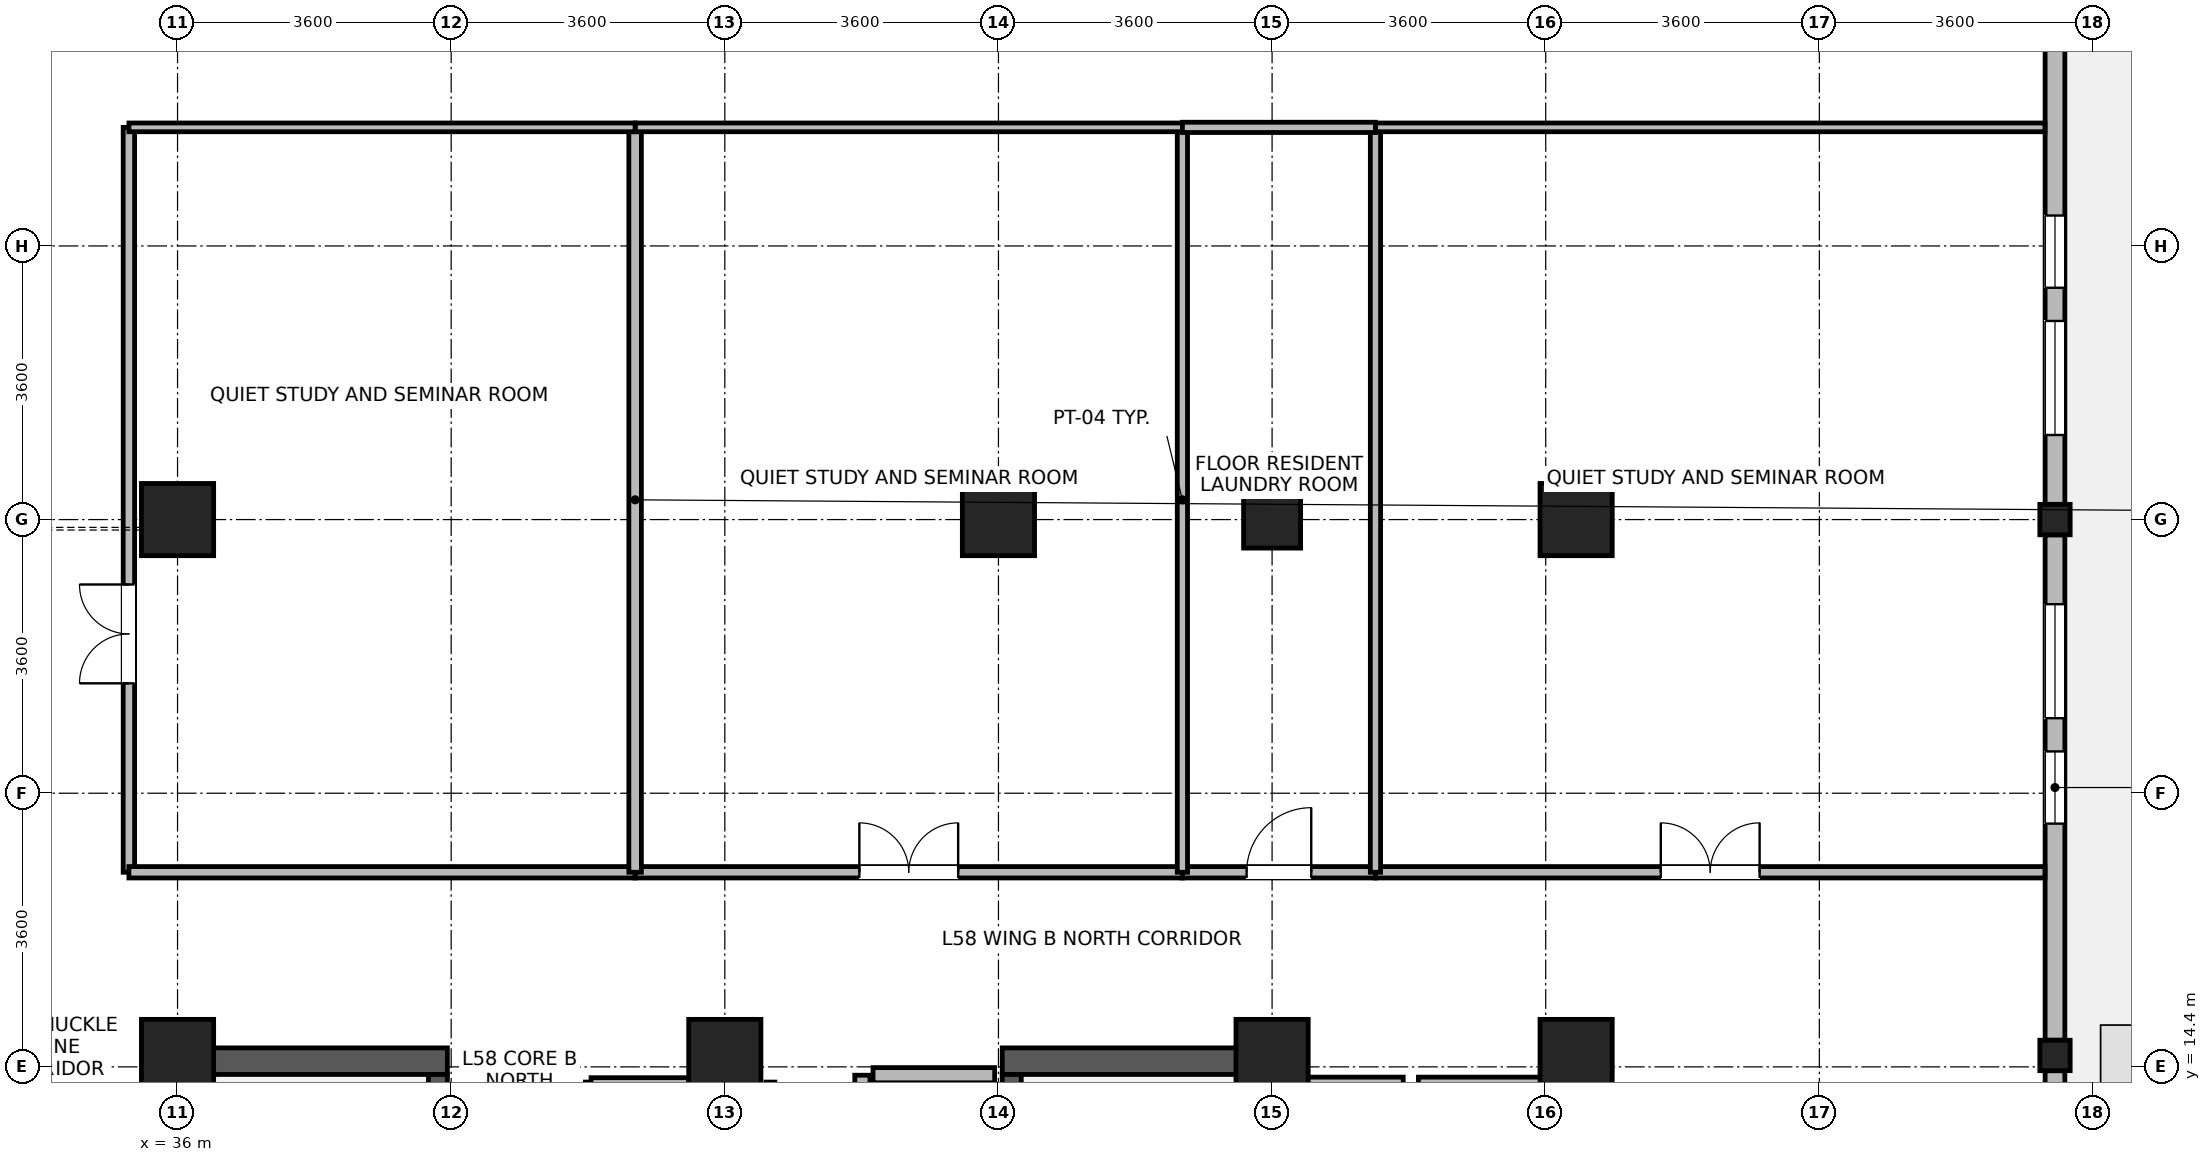
"""IFC4 building model, lengths in metres.
Left out: names, types, materials, properties, quantities, classifications, styles, units other than length and angle.
Written with IfcOpenShell. Run it as: python <this file> out.ifc"""

import sys

from ifc_helpers import new_model, si_unit, direction, frame, frame_2d, origin, origin_2d, place, context, subcontext, project, spatial, rectangle, i_section, extrude, source, transform, mapped, element, fill, save


model = new_model("IFC4")
c1 = context("Model", 3, precision=1e-05, world=origin(), true_north=direction((0.0, 1.0)))
c2 = subcontext(c1, "Body", "Model", "MODEL_VIEW")
j1 = project(units=[si_unit("LENGTHUNIT", "METRE"), si_unit("PLANEANGLEUNIT", "RADIAN")], contexts=[c1])
p1 = place(None, origin())
s1 = spatial("IfcSite", under=j1, at=p1, CompositionType="ELEMENT")
p2 = place(p1, origin())
s2 = spatial("IfcBuilding", under=s1, at=p2, CompositionType="ELEMENT")
p3 = place(p2, frame((0.0, 0.0, 227.7)))
s3 = spatial("IfcBuildingStorey", under=s2, at=p3, CompositionType="ELEMENT", Elevation=227.7)
for number, where, z_axis, x_axis in (
    (1, (36.175, 6.95, 0.0), (0.0, 0.0, 1.0), (0.0, 1.0, 0.0)),
    (2, (50.225, 6.95, 0.0), (0.0, 0.0, 1.0), (0.0, 1.0, 0.0)),
):
    element("IfcWall", number, at=place(p3, frame(where, z_axis=z_axis, x_axis=x_axis)), inside=s3, PredefinedType="SHEAR", context=c2, shape_type="SweptSolid", body=[
        extrude(rectangle(XDim=7.7, YDim=0.35, at=frame_2d((3.85, 0.0))), origin(), (0.0, 0.0, 1.0), 3.47),
    ])
for number, where, z_axis, x_axis in (
    (3, (36.35, 14.475, 0.0), (0.0, 0.0, 1.0), (1.0, 0.0, 0.0)),
    (4, (46.85, 14.475, 0.0), (0.0, 0.0, 1.0), (1.0, 0.0, 0.0)),
):
    element("IfcWall", number, at=place(p3, frame(where, z_axis=z_axis, x_axis=x_axis)), inside=s3, PredefinedType="SHEAR", context=c2, shape_type="SweptSolid", body=[
        extrude(rectangle(XDim=3.2, YDim=0.35, at=frame_2d((1.6, 0.0))), origin(), (0.0, 0.0, 1.0), 3.47),
    ])
p4 = place(p3, frame((39.425, 7.3, 0.0), z_axis=(0.0, 0.0, 1.0), x_axis=(0.0, 1.0, 0.0)))
e5 = element("IfcWall", 5, at=p4, inside=s3, PredefinedType="SHEAR", context=c2, shape_type="SweptSolid", body=[
    extrude(rectangle(XDim=7.0, YDim=0.25, at=frame_2d((3.5, 0.0))), origin(), (0.0, 0.0, 1.0), 3.47),
])
p5 = place(p4, frame((0.15, 0.0, 0.0)))
e6 = element("IfcOpeningElement", 6, at=p5, cuts=e5, PredefinedType="OPENING", context=c2, shape_type="SweptSolid", body=[
    extrude(rectangle(XDim=1.1, YDim=2.08, at=frame_2d((0.55, 1.04))), frame((0.0, 0.135, 0.0), z_axis=(0.0, -1.0, 0.0), x_axis=(1.0, 0.0, 0.0)), (0.0, 0.0, 1.0), 0.27),
])
p6 = place(p3, frame((46.975, 7.3, 0.0), z_axis=(0.0, 0.0, 1.0), x_axis=(0.0, 1.0, 0.0)))
e7 = element("IfcWall", 7, at=p6, inside=s3, PredefinedType="SHEAR", context=c2, shape_type="SweptSolid", body=[
    extrude(rectangle(XDim=7.0, YDim=0.25, at=frame_2d((3.5, 0.0))), origin(), (0.0, 0.0, 1.0), 3.47),
])
p7 = place(p6, frame((0.15, 0.0, 0.0)))
e8 = element("IfcOpeningElement", 8, at=p7, cuts=e7, PredefinedType="OPENING", context=c2, shape_type="SweptSolid", body=[
    extrude(rectangle(XDim=1.1, YDim=2.08, at=frame_2d((0.55, 1.04))), frame((0.0, 0.135, 0.0), z_axis=(0.0, -1.0, 0.0), x_axis=(1.0, 0.0, 0.0)), (0.0, 0.0, 1.0), 0.27),
])
m1 = source(origin(), c2, "Body", "SweptSolid", [
    extrude(rectangle(XDim=0.95, YDim=0.95, at=origin_2d()), origin(), (0.0, 0.0, 1.0), 3.7),
])
for number, where, z_axis, x_axis in (
    (9, (36.0, 21.6, 0.0), (0.0, 0.0, 1.0), (1.0, 0.0, 0.0)),
    (10, (46.8, 21.6, 0.0), (0.0, 0.0, 1.0), (1.0, 0.0, 0.0)),
    (11, (36.0, 14.55, 0.0), (0.0, 0.0, 1.0), (1.0, 0.0, 0.0)),
    (12, (43.2, 14.55, 0.0), (0.0, 0.0, 1.0), (1.0, 0.0, 0.0)),
    (13, (50.4, 14.55, 0.0), (0.0, 0.0, 1.0), (1.0, 0.0, 0.0)),
):
    element("IfcColumn", number, at=place(p3, frame(where, z_axis=z_axis, x_axis=x_axis)), inside=s3, PredefinedType="COLUMN", context=c2, shape_type="MappedRepresentation", body=[
        mapped(m1, transform((0.0, 0.0, 0.0), x_axis=(1.0, 0.0, 0.0), y_axis=(0.0, 1.0, 0.0), z_axis=(0.0, 0.0, 1.0), scale=1.0)),
    ])
m2 = source(origin(), c2, "Body", "SweptSolid", [
    extrude(rectangle(XDim=0.75, YDim=0.75, at=origin_2d()), origin(), (0.0, 0.0, 1.0), 3.7),
])
p8 = place(p3, frame((50.4, 21.6, 0.0), z_axis=(0.0, 0.0, 1.0), x_axis=(1.0, 0.0, 0.0)))
e14 = element("IfcColumn", 14, at=p8, inside=s3, PredefinedType="PILASTER", context=c2, shape_type="MappedRepresentation", body=[
    mapped(m2, transform((0.0, 0.0, 0.0), x_axis=(1.0, 0.0, 0.0), y_axis=(0.0, 1.0, 0.0), z_axis=(0.0, 0.0, 1.0), scale=1.0)),
])
for number, where, z_axis, x_axis in (
    (15, (54.4, 14.55, 0.0), (0.0, 0.0, 1.0), (1.0, 0.0, 0.0)),
    (16, (54.4, 21.6, 0.0), (0.0, 0.0, 1.0), (1.0, 0.0, 0.0)),
):
    element("IfcColumn", number, at=place(p3, frame(where, z_axis=z_axis, x_axis=x_axis)), inside=s3, PredefinedType="COLUMN", context=c2, shape_type="MappedRepresentation", body=[
        mapped(m1, transform((0.0, 0.0, 0.0), x_axis=(1.0, 0.0, 0.0), y_axis=(0.0, 1.0, 0.0), z_axis=(0.0, 0.0, 1.0), scale=1.0)),
    ])
m3 = source(origin(), c2, "Body", "SweptSolid", [
    extrude(i_section(OverallWidth=0.399, OverallDepth=0.4, WebThickness=0.017, FlangeThickness=0.023, FilletRadius=0.015, at=origin_2d()), origin(), (0.0, 0.0, 1.0), 3.7),
])
for number, where, z_axis, x_axis in (
    (17, (60.7, 14.55, 0.0), (0.0, 0.0, 1.0), (1.0, 0.0, 0.0)),
    (18, (60.7, 21.6, 0.0), (0.0, 0.0, 1.0), (1.0, 0.0, 0.0)),
):
    element("IfcColumn", number, at=place(p3, frame(where, z_axis=z_axis, x_axis=x_axis)), inside=s3, PredefinedType="COLUMN", context=c2, shape_type="MappedRepresentation", body=[
        mapped(m3, transform((0.0, 0.0, 0.0), x_axis=(1.0, 0.0, 0.0), y_axis=(0.0, 1.0, 0.0), z_axis=(0.0, 0.0, 1.0), scale=1.0)),
    ])
p9 = place(p3, frame((60.7, 14.349, 0.0), z_axis=(0.0, 0.0, 1.0), x_axis=(0.0, -1.0, 0.0)))
e19 = element("IfcWall", 19, at=p9, inside=s3, PredefinedType="STANDARD", context=c2, shape_type="SweptSolid", body=[
    extrude(rectangle(XDim=5.079, YDim=0.26, at=frame_2d((2.54, 0.0))), origin(), (0.0, 0.0, 1.0), 3.05),
])
p10 = place(p9, frame((1.79, 0.0, 0.0)))
e20 = element("IfcOpeningElement", 20, at=p10, cuts=e19, PredefinedType="OPENING", context=c2, shape_type="SweptSolid", body=[
    extrude(rectangle(XDim=1.5, YDim=2.15, at=frame_2d((0.75, 1.075))), frame((0.0, 0.14, 0.0), z_axis=(0.0, -1.0, 0.0), x_axis=(1.0, 0.0, 0.0)), (0.0, 0.0, 1.0), 0.28),
])
p11 = place(p3, frame((60.7, 21.399, 0.0), z_axis=(0.0, 0.0, 1.0), x_axis=(0.0, -1.0, 0.0)))
e21 = element("IfcWall", 21, at=p11, inside=s3, PredefinedType="STANDARD", context=c2, shape_type="SweptSolid", body=[
    extrude(rectangle(XDim=6.648, YDim=0.26, at=frame_2d((3.324, 0.0))), origin(), (0.0, 0.0, 1.0), 3.05),
])
p12 = place(p11, frame((0.912, 0.0, 0.85)))
e22 = element("IfcOpeningElement", 22, at=p12, cuts=e21, PredefinedType="OPENING", context=c2, shape_type="SweptSolid", body=[
    extrude(rectangle(XDim=1.5, YDim=1.85, at=frame_2d((0.75, 0.925))), frame((0.0, 0.14, 0.0), z_axis=(0.0, -1.0, 0.0), x_axis=(1.0, 0.0, 0.0)), (0.0, 0.0, 1.0), 0.28),
])
p13 = place(p11, frame((2.849, 0.0, 0.85)))
e23 = element("IfcOpeningElement", 23, at=p13, cuts=e21, PredefinedType="OPENING", context=c2, shape_type="SweptSolid", body=[
    extrude(rectangle(XDim=0.95, YDim=1.75, at=frame_2d((0.475, 0.875))), frame((0.0, 0.14, 0.0), z_axis=(0.0, -1.0, 0.0), x_axis=(1.0, 0.0, 0.0)), (0.0, 0.0, 1.0), 0.28),
])
p14 = place(p3, frame((60.7, 28.449, 0.0), z_axis=(0.0, 0.0, 1.0), x_axis=(0.0, -1.0, 0.0)))
e24 = element("IfcWall", 24, at=p14, inside=s3, PredefinedType="STANDARD", context=c2, shape_type="SweptSolid", body=[
    extrude(rectangle(XDim=6.648, YDim=0.26, at=frame_2d((3.324, 0.0))), origin(), (0.0, 0.0, 1.0), 3.05),
])
p15 = place(p14, frame((4.236, 0.0, 0.85)))
e25 = element("IfcOpeningElement", 25, at=p15, cuts=e24, PredefinedType="OPENING", context=c2, shape_type="SweptSolid", body=[
    extrude(rectangle(XDim=1.5, YDim=1.85, at=frame_2d((0.75, 0.925))), frame((0.0, 0.14, 0.0), z_axis=(0.0, -1.0, 0.0), x_axis=(1.0, 0.0, 0.0)), (0.0, 0.0, 1.0), 0.28),
])
p16 = place(p14, frame((2.849, 0.0, 0.85)))
e26 = element("IfcOpeningElement", 26, at=p16, cuts=e24, PredefinedType="OPENING", context=c2, shape_type="SweptSolid", body=[
    extrude(rectangle(XDim=0.95, YDim=1.75, at=frame_2d((0.475, 0.875))), frame((0.0, 0.14, 0.0), z_axis=(0.0, -1.0, 0.0), x_axis=(1.0, 0.0, 0.0)), (0.0, 0.0, 1.0), 0.28),
])
p17 = place(p3, frame((50.475, 14.165, 0.0), z_axis=(0.0, 0.0, 1.0), x_axis=(1.0, 0.0, 0.0)))
e27 = element("IfcWall", 27, at=p17, inside=s3, PredefinedType="PARTITIONING", context=c2, shape_type="SweptSolid", body=[
    extrude(rectangle(XDim=1.65, YDim=0.2, at=frame_2d((0.825, 0.0))), origin(), (0.0, 0.0, 1.0), 3.45),
])
p18 = place(p3, frame((52.325, 14.165, 0.0), z_axis=(0.0, 0.0, 1.0), x_axis=(1.0, 0.0, 0.0)))
e28 = element("IfcWall", 28, at=p18, inside=s3, PredefinedType="PARTITIONING", context=c2, shape_type="SweptSolid", body=[
    extrude(rectangle(XDim=1.65, YDim=0.2, at=frame_2d((0.825, 0.0))), origin(), (0.0, 0.0, 1.0), 3.45),
])
p19 = place(p3, frame((45.15, 14.29, 0.0), z_axis=(0.0, 0.0, 1.0), x_axis=(1.0, 0.0, 0.0)))
e29 = element("IfcWall", 29, at=p19, inside=s3, PredefinedType="PARTITIONING", context=c2, shape_type="SweptSolid", body=[
    extrude(rectangle(XDim=1.6, YDim=0.2, at=frame_2d((0.8, 0.0))), origin(), (0.0, 0.0, 1.0), 2.55),
])
p20 = place(p3, frame((45.01, 11.61, 0.0), z_axis=(0.0, 0.0, 1.0), x_axis=(0.0, 1.0, 0.0)))
e30 = element("IfcWall", 30, at=p20, inside=s3, PredefinedType="PARTITIONING", context=c2, shape_type="SweptSolid", body=[
    extrude(rectangle(XDim=2.68, YDim=0.2, at=frame_2d((1.34, 0.0))), origin(), (0.0, 0.0, 1.0), 3.45),
])
p21 = place(p3, frame((35.36, 16.96, 0.0), z_axis=(0.0, 0.0, 1.0), x_axis=(0.0, 1.0, 0.0)))
e31 = element("IfcWall", 31, at=p21, inside=s3, PredefinedType="PARTITIONING", context=c2, shape_type="SweptSolid", body=[
    extrude(rectangle(XDim=9.8, YDim=0.15, at=frame_2d((4.9, 0.0))), origin(), (0.0, 0.0, 1.0), 3.45),
])
p22 = place(p21, frame((2.486, 0.0, 0.0)))
e32 = element("IfcOpeningElement", 32, at=p22, cuts=e31, PredefinedType="OPENING", context=c2, shape_type="SweptSolid", body=[
    extrude(rectangle(XDim=1.3, YDim=2.12, at=frame_2d((0.65, 1.06))), frame((0.0, 0.085, 0.0), z_axis=(0.0, -1.0, 0.0), x_axis=(1.0, 0.0, 0.0)), (0.0, 0.0, 1.0), 0.17),
])
p23 = place(p3, frame((51.76, 16.96, 0.0), z_axis=(0.0, 0.0, 1.0), x_axis=(1.0, 0.0, 0.0)))
e33 = element("IfcWall", 33, at=p23, inside=s3, PredefinedType="PARTITIONING", context=c2, shape_type="SweptSolid", body=[
    extrude(rectangle(XDim=8.808, YDim=0.15, at=frame_2d((4.404, 0.0))), origin(), (0.0, 0.0, 1.0), 3.45),
])
p24 = place(p23, frame((3.754, 0.0, 0.0)))
e34 = element("IfcOpeningElement", 34, at=p24, cuts=e33, PredefinedType="OPENING", context=c2, shape_type="SweptSolid", body=[
    extrude(rectangle(XDim=1.3, YDim=2.12, at=frame_2d((0.65, 1.06))), frame((0.0, 0.085, 0.0), z_axis=(0.0, -1.0, 0.0), x_axis=(1.0, 0.0, 0.0)), (0.0, 0.0, 1.0), 0.17),
])
p25 = place(p3, frame((42.02, 16.96, 0.0), z_axis=(0.0, 0.0, 1.0), x_axis=(1.0, 0.0, 0.0)))
e35 = element("IfcWall", 35, at=p25, inside=s3, PredefinedType="PARTITIONING", context=c2, shape_type="SweptSolid", body=[
    extrude(rectangle(XDim=7.2, YDim=0.15, at=frame_2d((3.6, 0.0))), origin(), (0.0, 0.0, 1.0), 3.45),
])
p26 = place(p25, frame((2.95, 0.0, 0.0)))
e36 = element("IfcOpeningElement", 36, at=p26, cuts=e35, PredefinedType="OPENING", context=c2, shape_type="SweptSolid", body=[
    extrude(rectangle(XDim=1.3, YDim=2.12, at=frame_2d((0.65, 1.06))), frame((0.0, 0.085, 0.0), z_axis=(0.0, -1.0, 0.0), x_axis=(1.0, 0.0, 0.0)), (0.0, 0.0, 1.0), 0.17),
])
p27 = place(p3, frame((35.36, 16.96, 0.0), z_axis=(0.0, 0.0, 1.0), x_axis=(1.0, 0.0, 0.0)))
e37 = element("IfcWall", 37, at=p27, inside=s3, PredefinedType="PARTITIONING", context=c2, shape_type="SweptSolid", body=[
    extrude(rectangle(XDim=6.66, YDim=0.15, at=frame_2d((3.33, 0.0))), origin(), (0.0, 0.0, 1.0), 3.45),
])
p28 = place(p3, frame((49.22, 16.96, 0.0), z_axis=(0.0, 0.0, 1.0), x_axis=(1.0, 0.0, 0.0)))
e38 = element("IfcWall", 38, at=p28, inside=s3, PredefinedType="PARTITIONING", context=c2, shape_type="SweptSolid", body=[
    extrude(rectangle(XDim=2.54, YDim=0.15, at=frame_2d((1.27, 0.0))), origin(), (0.0, 0.0, 1.0), 3.45),
])
p29 = place(p28, frame((0.845, 0.0, 0.0)))
e39 = element("IfcOpeningElement", 39, at=p29, cuts=e38, PredefinedType="OPENING", context=c2, shape_type="SweptSolid", body=[
    extrude(rectangle(XDim=0.85, YDim=2.04, at=frame_2d((0.425, 1.02))), frame((0.0, 0.085, 0.0), z_axis=(0.0, -1.0, 0.0), x_axis=(1.0, 0.0, 0.0)), (0.0, 0.0, 1.0), 0.17),
])
p30 = place(p3, frame((42.02, 16.96, 0.0), z_axis=(0.0, 0.0, 1.0), x_axis=(0.0, 1.0, 0.0)))
e40 = element("IfcWall", 40, at=p30, inside=s3, PredefinedType="PARTITIONING", context=c2, shape_type="SweptSolid", body=[
    extrude(rectangle(XDim=9.8, YDim=0.165, at=frame_2d((4.9, 0.0))), origin(), (0.0, 0.0, 1.0), 3.45),
])
for number, where, z_axis, x_axis in (
    (41, (49.22, 16.96, 0.0), (0.0, 0.0, 1.0), (0.0, 1.0, 0.0)),
    (42, (51.76, 16.96, 0.0), (0.0, 0.0, 1.0), (0.0, 1.0, 0.0)),
):
    element("IfcWall", number, at=place(p3, frame(where, z_axis=z_axis, x_axis=x_axis)), inside=s3, PredefinedType="PARTITIONING", context=c2, shape_type="SweptSolid", body=[
        extrude(rectangle(XDim=9.8, YDim=0.135, at=frame_2d((4.9, 0.0))), origin(), (0.0, 0.0, 1.0), 3.45),
    ])
p31 = place(p3, frame((51.76, 26.76, 0.0), z_axis=(0.0, 0.0, 1.0), x_axis=(1.0, 0.0, 0.0)))
e43 = element("IfcWall", 43, at=p31, inside=s3, PredefinedType="PARTITIONING", context=c2, shape_type="SweptSolid", body=[
    extrude(rectangle(XDim=8.808, YDim=0.115, at=frame_2d((4.404, 0.0))), origin(), (0.0, 0.0, 1.0), 3.45),
])
p32 = place(p3, frame((42.02, 26.76, 0.0), z_axis=(0.0, 0.0, 1.0), x_axis=(1.0, 0.0, 0.0)))
e44 = element("IfcWall", 44, at=p32, inside=s3, PredefinedType="PARTITIONING", context=c2, shape_type="SweptSolid", body=[
    extrude(rectangle(XDim=7.2, YDim=0.115, at=frame_2d((3.6, 0.0))), origin(), (0.0, 0.0, 1.0), 3.45),
])
p33 = place(p3, frame((35.36, 26.76, 0.0), z_axis=(0.0, 0.0, 1.0), x_axis=(1.0, 0.0, 0.0)))
e45 = element("IfcWall", 45, at=p33, inside=s3, PredefinedType="PARTITIONING", context=c2, shape_type="SweptSolid", body=[
    extrude(rectangle(XDim=6.66, YDim=0.115, at=frame_2d((3.33, 0.0))), origin(), (0.0, 0.0, 1.0), 3.45),
])
p34 = place(p3, frame((49.22, 26.76, 0.0), z_axis=(0.0, 0.0, 1.0), x_axis=(1.0, 0.0, 0.0)))
e46 = element("IfcWall", 46, at=p34, inside=s3, PredefinedType="PARTITIONING", context=c2, shape_type="SweptSolid", body=[
    extrude(rectangle(XDim=2.54, YDim=0.135, at=frame_2d((1.27, 0.0))), origin(), (0.0, 0.0, 1.0), 3.45),
])
p35 = place(p3, frame((41.44, 14.2, 0.0), z_axis=(0.0, 0.0, 1.0), x_axis=(1.0, 0.0, 0.0)))
e47 = element("IfcWall", 47, at=p35, inside=s3, PredefinedType="PARTITIONING", context=c2, shape_type="SweptSolid", body=[
    extrude(rectangle(XDim=1.285, YDim=0.115, at=frame_2d((0.643, 0.0))), origin(), (0.0, 0.0, 1.0), 2.55),
])
p36 = place(p12, origin())
e48 = element("IfcWindow", 48, at=p36, inside=s3, PartitioningType="SINGLE_PANEL", PredefinedType="WINDOW", context=c2, shape_type="SweptSolid", body=[
    extrude(rectangle(XDim=1.5, YDim=1.85, at=frame_2d((0.75, 0.925))), frame((0.0, 0.03, 0.0), z_axis=(0.0, -1.0, 0.0), x_axis=(1.0, 0.0, 0.0)), (0.0, 0.0, 1.0), 0.06),
])
fill(e22, e48)
p37 = place(p13, origin())
e49 = element("IfcWindow", 49, at=p37, inside=s3, PartitioningType="SINGLE_PANEL", PredefinedType="WINDOW", context=c2, shape_type="SweptSolid", body=[
    extrude(rectangle(XDim=0.95, YDim=1.75, at=frame_2d((0.475, 0.875))), frame((0.0, 0.03, 0.0), z_axis=(0.0, -1.0, 0.0), x_axis=(1.0, 0.0, 0.0)), (0.0, 0.0, 1.0), 0.06),
])
fill(e23, e49)
p38 = place(p15, origin())
e50 = element("IfcWindow", 50, at=p38, inside=s3, PartitioningType="SINGLE_PANEL", PredefinedType="WINDOW", context=c2, shape_type="SweptSolid", body=[
    extrude(rectangle(XDim=1.5, YDim=1.85, at=frame_2d((0.75, 0.925))), frame((0.0, 0.03, 0.0), z_axis=(0.0, -1.0, 0.0), x_axis=(1.0, 0.0, 0.0)), (0.0, 0.0, 1.0), 0.06),
])
fill(e25, e50)
p39 = place(p16, origin())
e51 = element("IfcWindow", 51, at=p39, inside=s3, PartitioningType="SINGLE_PANEL", PredefinedType="WINDOW", context=c2, shape_type="SweptSolid", body=[
    extrude(rectangle(XDim=0.95, YDim=1.75, at=frame_2d((0.475, 0.875))), frame((0.0, 0.03, 0.0), z_axis=(0.0, -1.0, 0.0), x_axis=(1.0, 0.0, 0.0)), (0.0, 0.0, 1.0), 0.06),
])
fill(e26, e51)
p40 = place(p22, origin())
e52 = element("IfcDoor", 52, at=p40, inside=s3, OperationType="DOUBLE_DOOR_SINGLE_SWING", PredefinedType="DOOR", context=c2, shape_type="SweptSolid", body=[
    extrude(rectangle(XDim=1.3, YDim=2.12, at=frame_2d((0.65, 1.06))), frame((0.0, 0.025, 0.0), z_axis=(0.0, -1.0, 0.0), x_axis=(1.0, 0.0, 0.0)), (0.0, 0.0, 1.0), 0.05),
])
fill(e32, e52)
p41 = place(p24, origin())
e53 = element("IfcDoor", 53, at=p41, inside=s3, OperationType="DOUBLE_DOOR_SINGLE_SWING", PredefinedType="DOOR", context=c2, shape_type="SweptSolid", body=[
    extrude(rectangle(XDim=1.3, YDim=2.12, at=frame_2d((0.65, 1.06))), frame((0.0, 0.025, 0.0), z_axis=(0.0, -1.0, 0.0), x_axis=(1.0, 0.0, 0.0)), (0.0, 0.0, 1.0), 0.05),
])
fill(e34, e53)
p42 = place(p26, origin())
e54 = element("IfcDoor", 54, at=p42, inside=s3, OperationType="DOUBLE_DOOR_SINGLE_SWING", PredefinedType="DOOR", context=c2, shape_type="SweptSolid", body=[
    extrude(rectangle(XDim=1.3, YDim=2.12, at=frame_2d((0.65, 1.06))), frame((0.0, 0.025, 0.0), z_axis=(0.0, -1.0, 0.0), x_axis=(1.0, 0.0, 0.0)), (0.0, 0.0, 1.0), 0.05),
])
fill(e36, e54)
p43 = place(p29, origin())
e55 = element("IfcDoor", 55, at=p43, inside=s3, OperationType="SINGLE_SWING_RIGHT", PredefinedType="DOOR", context=c2, shape_type="SweptSolid", body=[
    extrude(rectangle(XDim=0.85, YDim=2.04, at=frame_2d((0.425, 1.02))), frame((0.0, 0.025, 0.0), z_axis=(0.0, -1.0, 0.0), x_axis=(1.0, 0.0, 0.0)), (0.0, 0.0, 1.0), 0.05),
])
fill(e39, e55)
save(model, sys.argv[1])
